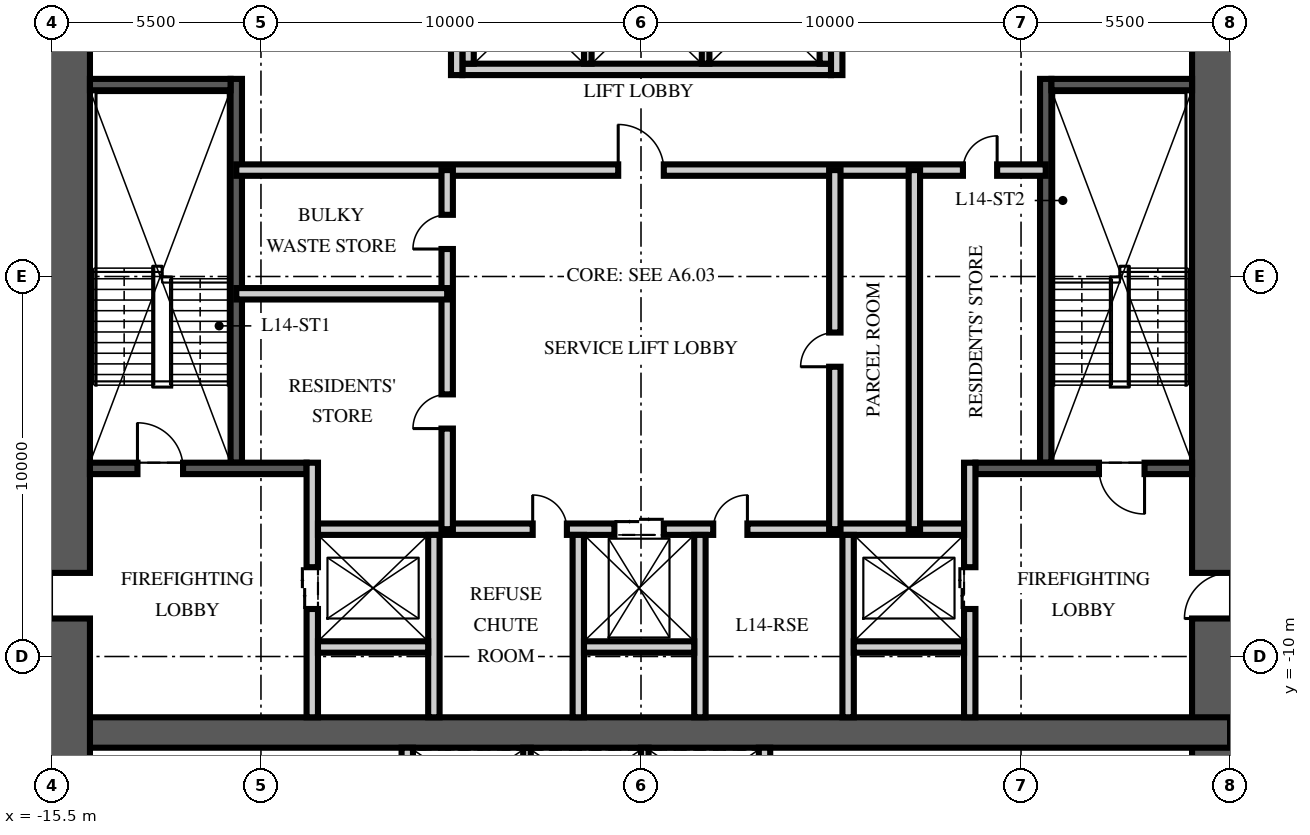
"""IFC4 building model, lengths in metres.
Left out: names, types, materials, properties, quantities, classifications, styles, units other than length and angle.
Written with IfcOpenShell. Run it as: python <this file> out.ifc"""

import sys

from ifc_helpers import new_model, si_unit, direction, frame, frame_2d, origin, place, context, subcontext, project, spatial, rectangle, extrude, element, fill, save


model = new_model("IFC4")
c1 = context("Model", 3, precision=1e-05, world=origin(), true_north=direction((0.0, 1.0)))
c2 = subcontext(c1, "Body", "Model", "MODEL_VIEW")
j1 = project(units=[si_unit("LENGTHUNIT", "METRE"), si_unit("PLANEANGLEUNIT", "RADIAN")], contexts=[c1])
p1 = place(None, origin())
s1 = spatial("IfcSite", under=j1, at=p1, CompositionType="ELEMENT")
p2 = place(p1, origin())
s2 = spatial("IfcBuilding", under=s1, at=p2, CompositionType="ELEMENT")
p3 = place(p2, frame((0.0, 0.0, 58.5)))
s3 = spatial("IfcBuildingStorey", under=s2, at=p3, CompositionType="ELEMENT", Elevation=58.5)
p4 = place(p3, frame((15.5, -15.5, -0.25), z_axis=(0.0, 0.0, 1.0), x_axis=(0.0, 1.0, 0.0)))
e1 = element("IfcWall", 1, at=p4, inside=s3, PredefinedType="SHEAR", context=c2, shape_type="SweptSolid", body=[
    extrude(rectangle(XDim=31.0, YDim=2.0, at=frame_2d((15.5, 0.0))), origin(), (0.0, 0.0, 1.0), 3.75),
])
p5 = place(p4, frame((6.5, 0.0, 0.25)))
e2 = element("IfcOpeningElement", 2, at=p5, cuts=e1, PredefinedType="OPENING", context=c2, shape_type="SweptSolid", body=[
    extrude(rectangle(XDim=1.2, YDim=2.1, at=frame_2d((0.6, 1.05))), frame((0.0, 1.01, 0.0), z_axis=(0.0, -1.0, 0.0), x_axis=(1.0, 0.0, 0.0)), (0.0, 0.0, 1.0), 2.02),
])
p6 = place(p4, frame((23.0, 0.0, 0.25)))
e3 = element("IfcOpeningElement", 3, at=p6, cuts=e1, PredefinedType="OPENING", context=c2, shape_type="SweptSolid", body=[
    extrude(rectangle(XDim=1.8, YDim=2.1, at=frame_2d((0.9, 1.05))), frame((0.0, 1.01, 0.0), z_axis=(0.0, -1.0, 0.0), x_axis=(1.0, 0.0, 0.0)), (0.0, 0.0, 1.0), 2.02),
])
p7 = place(p3, frame((-15.5, -12.0, -0.25), z_axis=(0.0, 0.0, 1.0), x_axis=(1.0, 0.0, 0.0)))
e4 = element("IfcWall", 4, at=p7, inside=s3, PredefinedType="SHEAR", context=c2, shape_type="SweptSolid", body=[
    extrude(rectangle(XDim=31.0, YDim=0.8, at=frame_2d((15.5, 0.0))), origin(), (0.0, 0.0, 1.0), 3.75),
])
p8 = place(p3, frame((-15.5, -15.5, -0.25), z_axis=(0.0, 0.0, 1.0), x_axis=(0.0, 1.0, 0.0)))
e5 = element("IfcWall", 5, at=p8, inside=s3, PredefinedType="SHEAR", context=c2, shape_type="SweptSolid", body=[
    extrude(rectangle(XDim=31.0, YDim=2.0, at=frame_2d((15.5, 0.0))), origin(), (0.0, 0.0, 1.0), 3.75),
])
p9 = place(p8, frame((6.5, 0.0, 0.25)))
e6 = element("IfcOpeningElement", 6, at=p9, cuts=e5, PredefinedType="OPENING", context=c2, shape_type="SweptSolid", body=[
    extrude(rectangle(XDim=1.2, YDim=2.1, at=frame_2d((0.6, 1.05))), frame((0.0, 1.01, 0.0), z_axis=(0.0, -1.0, 0.0), x_axis=(1.0, 0.0, 0.0)), (0.0, 0.0, 1.0), 2.02),
])
p10 = place(p8, frame((23.0, 0.0, 0.25)))
e7 = element("IfcOpeningElement", 7, at=p10, cuts=e5, PredefinedType="OPENING", context=c2, shape_type="SweptSolid", body=[
    extrude(rectangle(XDim=1.8, YDim=2.1, at=frame_2d((0.9, 1.05))), frame((0.0, 1.01, 0.0), z_axis=(0.0, -1.0, 0.0), x_axis=(1.0, 0.0, 0.0)), (0.0, 0.0, 1.0), 2.02),
])
p11 = place(p3, frame((-10.65, -4.9, 0.0), z_axis=(0.0, 0.0, 1.0), x_axis=(0.0, 1.0, 0.0)))
e8 = element("IfcWall", 8, at=p11, inside=s3, PredefinedType="SOLIDWALL", context=c2, shape_type="SweptSolid", body=[
    extrude(rectangle(XDim=10.1, YDim=0.3, at=frame_2d((5.05, 0.0))), origin(), (0.0, 0.0, 1.0), 3.5),
])
p12 = place(p3, frame((-14.5, -5.05, 0.0), z_axis=(0.0, 0.0, 1.0), x_axis=(1.0, 0.0, 0.0)))
e9 = element("IfcWall", 9, at=p12, inside=s3, PredefinedType="SOLIDWALL", context=c2, shape_type="SweptSolid", body=[
    extrude(rectangle(XDim=5.7, YDim=0.3, at=frame_2d((2.85, 0.0))), origin(), (0.0, 0.0, 1.0), 3.5),
])
p13 = place(p12, frame((1.25, 0.0, 0.0)))
e10 = element("IfcOpeningElement", 10, at=p13, cuts=e9, PredefinedType="OPENING", context=c2, shape_type="SweptSolid", body=[
    extrude(rectangle(XDim=1.2, YDim=2.1, at=frame_2d((0.6, 1.05))), frame((0.0, 0.16, 0.0), z_axis=(0.0, -1.0, 0.0), x_axis=(1.0, 0.0, 0.0)), (0.0, 0.0, 1.0), 0.32),
])
p14 = place(p3, frame((-14.5, 5.05, 0.0), z_axis=(0.0, 0.0, 1.0), x_axis=(1.0, 0.0, 0.0)))
e11 = element("IfcWall", 11, at=p14, inside=s3, PredefinedType="SOLIDWALL", context=c2, shape_type="SweptSolid", body=[
    extrude(rectangle(XDim=3.7, YDim=0.3, at=frame_2d((1.85, 0.0))), origin(), (0.0, 0.0, 1.0), 3.5),
])
p15 = place(p3, frame((-8.65, -11.6, 0.0), z_axis=(0.0, 0.0, 1.0), x_axis=(0.0, 1.0, 0.0)))
e12 = element("IfcWall", 12, at=p15, inside=s3, PredefinedType="PARTITIONING", context=c2, shape_type="SweptSolid", body=[
    extrude(rectangle(XDim=6.7, YDim=0.3, at=frame_2d((3.35, 0.0))), origin(), (0.0, 0.0, 1.0), 3.5),
])
p16 = place(p15, frame((2.85, 0.0, 0.0)))
e13 = element("IfcOpeningElement", 13, at=p16, cuts=e12, PredefinedType="OPENING", context=c2, shape_type="SweptSolid", body=[
    extrude(rectangle(XDim=1.1, YDim=2.1, at=frame_2d((0.55, 1.05))), frame((0.0, 0.16, 0.0), z_axis=(0.0, -1.0, 0.0), x_axis=(1.0, 0.0, 0.0)), (0.0, 0.0, 1.0), 0.32),
])
p17 = place(p3, frame((10.65, -4.9, 0.0), z_axis=(0.0, 0.0, 1.0), x_axis=(0.0, 1.0, 0.0)))
e14 = element("IfcWall", 14, at=p17, inside=s3, PredefinedType="SOLIDWALL", context=c2, shape_type="SweptSolid", body=[
    extrude(rectangle(XDim=10.1, YDim=0.3, at=frame_2d((5.05, 0.0))), origin(), (0.0, 0.0, 1.0), 3.5),
])
p18 = place(p3, frame((14.5, -5.05, 0.0), z_axis=(0.0, 0.0, 1.0), x_axis=(-1.0, 0.0, 0.0)))
e15 = element("IfcWall", 15, at=p18, inside=s3, PredefinedType="SOLIDWALL", context=c2, shape_type="SweptSolid", body=[
    extrude(rectangle(XDim=5.7, YDim=0.3, at=frame_2d((2.85, 0.0))), origin(), (0.0, 0.0, 1.0), 3.5),
])
p19 = place(p18, frame((1.25, 0.0, 0.0)))
e16 = element("IfcOpeningElement", 16, at=p19, cuts=e15, PredefinedType="OPENING", context=c2, shape_type="SweptSolid", body=[
    extrude(rectangle(XDim=1.2, YDim=2.1, at=frame_2d((0.6, 1.05))), frame((0.0, 0.16, 0.0), z_axis=(0.0, -1.0, 0.0), x_axis=(1.0, 0.0, 0.0)), (0.0, 0.0, 1.0), 0.32),
])
p20 = place(p3, frame((14.5, 5.05, 0.0), z_axis=(0.0, 0.0, 1.0), x_axis=(-1.0, 0.0, 0.0)))
e17 = element("IfcWall", 17, at=p20, inside=s3, PredefinedType="SOLIDWALL", context=c2, shape_type="SweptSolid", body=[
    extrude(rectangle(XDim=3.7, YDim=0.3, at=frame_2d((1.85, 0.0))), origin(), (0.0, 0.0, 1.0), 3.5),
])
p21 = place(p3, frame((8.65, -11.6, 0.0), z_axis=(0.0, 0.0, 1.0), x_axis=(0.0, 1.0, 0.0)))
e18 = element("IfcWall", 18, at=p21, inside=s3, PredefinedType="PARTITIONING", context=c2, shape_type="SweptSolid", body=[
    extrude(rectangle(XDim=6.7, YDim=0.3, at=frame_2d((3.35, 0.0))), origin(), (0.0, 0.0, 1.0), 3.5),
])
p22 = place(p21, frame((2.85, 0.0, 0.0)))
e19 = element("IfcOpeningElement", 19, at=p22, cuts=e18, PredefinedType="OPENING", context=c2, shape_type="SweptSolid", body=[
    extrude(rectangle(XDim=1.1, YDim=2.1, at=frame_2d((0.55, 1.05))), frame((0.0, 0.16, 0.0), z_axis=(0.0, -1.0, 0.0), x_axis=(1.0, 0.0, 0.0)), (0.0, 0.0, 1.0), 0.32),
])
p23 = place(p3, frame((-8.5, -6.65, 0.0), z_axis=(0.0, 0.0, 1.0), x_axis=(1.0, 0.0, 0.0)))
e20 = element("IfcWall", 20, at=p23, inside=s3, PredefinedType="PARTITIONING", context=c2, shape_type="SweptSolid", body=[
    extrude(rectangle(XDim=17.0, YDim=0.3, at=frame_2d((8.5, 0.0))), origin(), (0.0, 0.0, 1.0), 3.5),
])
p24 = place(p23, frame((7.8, 0.0, 0.0)))
e21 = element("IfcOpeningElement", 21, at=p24, cuts=e20, PredefinedType="OPENING", context=c2, shape_type="SweptSolid", body=[
    extrude(rectangle(XDim=1.3, YDim=2.4, at=frame_2d((0.65, 1.2))), frame((0.0, 0.16, 0.0), z_axis=(0.0, -1.0, 0.0), x_axis=(1.0, 0.0, 0.0)), (0.0, 0.0, 1.0), 0.32),
])
p25 = place(p23, frame((5.65, 0.0, 0.0)))
e22 = element("IfcOpeningElement", 22, at=p25, cuts=e20, PredefinedType="OPENING", context=c2, shape_type="SweptSolid", body=[
    extrude(rectangle(XDim=0.9, YDim=2.1, at=frame_2d((0.45, 1.05))), frame((0.0, 0.16, 0.0), z_axis=(0.0, -1.0, 0.0), x_axis=(1.0, 0.0, 0.0)), (0.0, 0.0, 1.0), 0.32),
])
p26 = place(p23, frame((10.4, 0.0, 0.0)))
e23 = element("IfcOpeningElement", 23, at=p26, cuts=e20, PredefinedType="OPENING", context=c2, shape_type="SweptSolid", body=[
    extrude(rectangle(XDim=0.9, YDim=2.1, at=frame_2d((0.45, 1.05))), frame((0.0, 0.16, 0.0), z_axis=(0.0, -1.0, 0.0), x_axis=(1.0, 0.0, 0.0)), (0.0, 0.0, 1.0), 0.32),
])
for number, where, z_axis, x_axis in (
    (24, (-5.45, -11.6, 0.0), (0.0, 0.0, 1.0), (0.0, 1.0, 0.0)),
    (25, (-1.65, -11.6, 0.0), (0.0, 0.0, 1.0), (0.0, 1.0, 0.0)),
    (26, (1.55, -11.6, 0.0), (0.0, 0.0, 1.0), (0.0, 1.0, 0.0)),
    (27, (5.45, -11.6, 0.0), (0.0, 0.0, 1.0), (0.0, 1.0, 0.0)),
):
    element("IfcWall", number, at=place(p3, frame(where, z_axis=z_axis, x_axis=x_axis)), inside=s3, PredefinedType="PARTITIONING", context=c2, shape_type="SweptSolid", body=[
        extrude(rectangle(XDim=4.8, YDim=0.3, at=frame_2d((2.4, 0.0))), origin(), (0.0, 0.0, 1.0), 3.5),
    ])
for number, where, z_axis, x_axis in (
    (28, (-8.5, -9.75, 0.0), (0.0, 0.0, 1.0), (1.0, 0.0, 0.0)),
    (29, (-1.5, -9.75, 0.0), (0.0, 0.0, 1.0), (1.0, 0.0, 0.0)),
    (30, (5.6, -9.75, 0.0), (0.0, 0.0, 1.0), (1.0, 0.0, 0.0)),
):
    element("IfcWall", number, at=place(p3, frame(where, z_axis=z_axis, x_axis=x_axis)), inside=s3, PredefinedType="PARTITIONING", context=c2, shape_type="SweptSolid", body=[
        extrude(rectangle(XDim=2.9, YDim=0.3, at=frame_2d((1.45, 0.0))), origin(), (0.0, 0.0, 1.0), 3.5),
    ])
p27 = place(p3, frame((-4.7, 5.45, 0.0), z_axis=(0.0, 0.0, 1.0), x_axis=(1.0, 0.0, 0.0)))
e31 = element("IfcWall", 31, at=p27, inside=s3, PredefinedType="PARTITIONING", context=c2, shape_type="SweptSolid", body=[
    extrude(rectangle(XDim=9.7, YDim=0.3, at=frame_2d((4.85, 0.0))), origin(), (0.0, 0.0, 1.0), 3.5),
])
for number, where, z_axis, x_axis in (
    (32, (-4.55, 5.6, 0.0), (0.0, 0.0, 1.0), (0.0, 1.0, 0.0)),
    (33, (4.85, 5.6, 0.0), (0.0, 0.0, 1.0), (0.0, 1.0, 0.0)),
):
    element("IfcWall", number, at=place(p3, frame(where, z_axis=z_axis, x_axis=x_axis)), inside=s3, PredefinedType="PARTITIONING", context=c2, shape_type="SweptSolid", body=[
        extrude(rectangle(XDim=2.8, YDim=0.3, at=frame_2d((1.4, 0.0))), origin(), (0.0, 0.0, 1.0), 3.5),
    ])
for number, where, z_axis, x_axis in (
    (34, (-1.4, 5.6, 0.0), (0.0, 0.0, 1.0), (0.0, 1.0, 0.0)),
    (35, (1.7, 5.6, 0.0), (0.0, 0.0, 1.0), (0.0, 1.0, 0.0)),
):
    element("IfcWall", number, at=place(p3, frame(where, z_axis=z_axis, x_axis=x_axis)), inside=s3, PredefinedType="PARTITIONING", context=c2, shape_type="SweptSolid", body=[
        extrude(rectangle(XDim=2.8, YDim=0.2, at=frame_2d((1.4, 0.0))), origin(), (0.0, 0.0, 1.0), 3.5),
    ])
for number, where, z_axis, x_axis in (
    (36, (-6.15, -14.5, 0.0), (0.0, 0.0, 1.0), (0.0, 1.0, 0.0)),
    (37, (3.25, -14.5, 0.0), (0.0, 0.0, 1.0), (0.0, 1.0, 0.0)),
):
    element("IfcWall", number, at=place(p3, frame(where, z_axis=z_axis, x_axis=x_axis)), inside=s3, PredefinedType="PARTITIONING", context=c2, shape_type="SweptSolid", body=[
        extrude(rectangle(XDim=2.1, YDim=0.3, at=frame_2d((1.05, 0.0))), origin(), (0.0, 0.0, 1.0), 3.5),
    ])
for number, where, z_axis, x_axis in (
    (38, (-3.0, -14.5, 0.0), (0.0, 0.0, 1.0), (0.0, 1.0, 0.0)),
    (39, (0.1, -14.5, 0.0), (0.0, 0.0, 1.0), (0.0, 1.0, 0.0)),
):
    element("IfcWall", number, at=place(p3, frame(where, z_axis=z_axis, x_axis=x_axis)), inside=s3, PredefinedType="PARTITIONING", context=c2, shape_type="SweptSolid", body=[
        extrude(rectangle(XDim=2.1, YDim=0.2, at=frame_2d((1.05, 0.0))), origin(), (0.0, 0.0, 1.0), 3.5),
    ])
p28 = place(p3, frame((-10.65, 2.8, 0.0), z_axis=(0.0, 0.0, 1.0), x_axis=(1.0, 0.0, 0.0)))
e40 = element("IfcWall", 40, at=p28, inside=s3, PredefinedType="PARTITIONING", context=c2, shape_type="SweptSolid", body=[
    extrude(rectangle(XDim=21.3, YDim=0.3, at=frame_2d((10.65, 0.0))), origin(), (0.0, 0.0, 1.0), 3.5),
])
p29 = place(p28, frame((10.05, 0.0, 0.0)))
e41 = element("IfcOpeningElement", 41, at=p29, cuts=e40, PredefinedType="OPENING", context=c2, shape_type="SweptSolid", body=[
    extrude(rectangle(XDim=1.2, YDim=2.1, at=frame_2d((0.6, 1.05))), frame((0.0, 0.16, 0.0), z_axis=(0.0, -1.0, 0.0), x_axis=(1.0, 0.0, 0.0)), (0.0, 0.0, 1.0), 0.32),
])
p30 = place(p28, frame((19.121, 0.0, 0.0)))
e42 = element("IfcOpeningElement", 42, at=p30, cuts=e40, PredefinedType="OPENING", context=c2, shape_type="SweptSolid", body=[
    extrude(rectangle(XDim=0.9, YDim=2.1, at=frame_2d((0.45, 1.05))), frame((0.0, 0.16, 0.0), z_axis=(0.0, -1.0, 0.0), x_axis=(1.0, 0.0, 0.0)), (0.0, 0.0, 1.0), 0.32),
])
p31 = place(p3, frame((-5.1, -6.65, 0.0), z_axis=(0.0, 0.0, 1.0), x_axis=(0.0, 1.0, 0.0)))
e43 = element("IfcWall", 43, at=p31, inside=s3, PredefinedType="PARTITIONING", context=c2, shape_type="SweptSolid", body=[
    extrude(rectangle(XDim=9.45, YDim=0.3, at=frame_2d((4.725, 0.0))), origin(), (0.0, 0.0, 1.0), 3.5),
])
p32 = place(p31, frame((2.648, 0.0, 0.0)))
e44 = element("IfcOpeningElement", 44, at=p32, cuts=e43, PredefinedType="OPENING", context=c2, shape_type="SweptSolid", body=[
    extrude(rectangle(XDim=0.9, YDim=2.1, at=frame_2d((0.45, 1.05))), frame((0.0, 0.16, 0.0), z_axis=(0.0, -1.0, 0.0), x_axis=(1.0, 0.0, 0.0)), (0.0, 0.0, 1.0), 0.32),
])
p33 = place(p31, frame((7.373, 0.0, 0.0)))
e45 = element("IfcOpeningElement", 45, at=p33, cuts=e43, PredefinedType="OPENING", context=c2, shape_type="SweptSolid", body=[
    extrude(rectangle(XDim=0.9, YDim=2.1, at=frame_2d((0.45, 1.05))), frame((0.0, 0.16, 0.0), z_axis=(0.0, -1.0, 0.0), x_axis=(1.0, 0.0, 0.0)), (0.0, 0.0, 1.0), 0.32),
])
p34 = place(p3, frame((5.1, -6.65, 0.0), z_axis=(0.0, 0.0, 1.0), x_axis=(0.0, 1.0, 0.0)))
e46 = element("IfcWall", 46, at=p34, inside=s3, PredefinedType="PARTITIONING", context=c2, shape_type="SweptSolid", body=[
    extrude(rectangle(XDim=9.45, YDim=0.3, at=frame_2d((4.725, 0.0))), origin(), (0.0, 0.0, 1.0), 3.5),
])
p35 = place(p34, frame((4.275, 0.0, 0.0)))
e47 = element("IfcOpeningElement", 47, at=p35, cuts=e46, PredefinedType="OPENING", context=c2, shape_type="SweptSolid", body=[
    extrude(rectangle(XDim=0.9, YDim=2.1, at=frame_2d((0.45, 1.05))), frame((0.0, 0.16, 0.0), z_axis=(0.0, -1.0, 0.0), x_axis=(1.0, 0.0, 0.0)), (0.0, 0.0, 1.0), 0.32),
])
p36 = place(p3, frame((-10.65, -0.455, 0.0), z_axis=(0.0, 0.0, 1.0), x_axis=(1.0, 0.0, 0.0)))
e48 = element("IfcWall", 48, at=p36, inside=s3, PredefinedType="PARTITIONING", context=c2, shape_type="SweptSolid", body=[
    extrude(rectangle(XDim=5.55, YDim=0.3, at=frame_2d((2.775, 0.0))), origin(), (0.0, 0.0, 1.0), 3.5),
])
p37 = place(p3, frame((7.193, -6.65, 0.0), z_axis=(0.0, 0.0, 1.0), x_axis=(0.0, 1.0, 0.0)))
e49 = element("IfcWall", 49, at=p37, inside=s3, PredefinedType="PARTITIONING", context=c2, shape_type="SweptSolid", body=[
    extrude(rectangle(XDim=9.45, YDim=0.3, at=frame_2d((4.725, 0.0))), origin(), (0.0, 0.0, 1.0), 3.5),
])
p38 = place(p3, frame((-4.85, 5.3, 0.0), z_axis=(0.0, 0.0, 1.0), x_axis=(0.0, 1.0, 0.0)))
e50 = element("IfcWall", 50, at=p38, inside=s3, PredefinedType="PARTITIONING", context=c2, shape_type="SweptSolid", body=[
    extrude(rectangle(XDim=6.3, YDim=0.3, at=frame_2d((3.15, 0.0))), origin(), (0.0, 0.0, 1.0), 3.5),
])
p39 = place(p38, frame((4.35, 0.0, 0.0)))
e51 = element("IfcOpeningElement", 51, at=p39, cuts=e50, PredefinedType="OPENING", context=c2, shape_type="SweptSolid", body=[
    extrude(rectangle(XDim=0.9, YDim=2.1, at=frame_2d((0.45, 1.05))), frame((0.0, 0.16, 0.0), z_axis=(0.0, -1.0, 0.0), x_axis=(1.0, 0.0, 0.0)), (0.0, 0.0, 1.0), 0.32),
])
p40 = place(p3, frame((5.15, 5.3, 0.0), z_axis=(0.0, 0.0, 1.0), x_axis=(0.0, 1.0, 0.0)))
e52 = element("IfcWall", 52, at=p40, inside=s3, PredefinedType="PARTITIONING", context=c2, shape_type="SweptSolid", body=[
    extrude(rectangle(XDim=6.3, YDim=0.3, at=frame_2d((3.15, 0.0))), origin(), (0.0, 0.0, 1.0), 3.5),
])
p41 = place(p13, origin())
e53 = element("IfcDoor", 53, at=p41, inside=s3, OperationType="SINGLE_SWING_LEFT", PredefinedType="DOOR", context=c2, shape_type="SweptSolid", body=[
    extrude(rectangle(XDim=1.2, YDim=2.1, at=frame_2d((0.6, 1.05))), frame((0.0, 0.025, 0.0), z_axis=(0.0, -1.0, 0.0), x_axis=(1.0, 0.0, 0.0)), (0.0, 0.0, 1.0), 0.05),
])
fill(e10, e53)
p42 = place(p9, origin())
e54 = element("IfcDoor", 54, at=p42, inside=s3, OperationType="SINGLE_SWING_LEFT", PredefinedType="DOOR", context=c2, shape_type="SweptSolid", body=[
    extrude(rectangle(XDim=1.2, YDim=2.1, at=frame_2d((0.6, 1.05))), frame((0.0, 0.025, 0.0), z_axis=(0.0, -1.0, 0.0), x_axis=(1.0, 0.0, 0.0)), (0.0, 0.0, 1.0), 0.05),
])
fill(e6, e54)
p43 = place(p19, origin())
e55 = element("IfcDoor", 55, at=p43, inside=s3, OperationType="SINGLE_SWING_LEFT", PredefinedType="DOOR", context=c2, shape_type="SweptSolid", body=[
    extrude(rectangle(XDim=1.2, YDim=2.1, at=frame_2d((0.6, 1.05))), frame((0.0, 0.025, 0.0), z_axis=(0.0, -1.0, 0.0), x_axis=(1.0, 0.0, 0.0)), (0.0, 0.0, 1.0), 0.05),
])
fill(e16, e55)
p44 = place(p5, origin())
e56 = element("IfcDoor", 56, at=p44, inside=s3, OperationType="SINGLE_SWING_LEFT", PredefinedType="DOOR", context=c2, shape_type="SweptSolid", body=[
    extrude(rectangle(XDim=1.2, YDim=2.1, at=frame_2d((0.6, 1.05))), frame((0.0, 0.025, 0.0), z_axis=(0.0, -1.0, 0.0), x_axis=(1.0, 0.0, 0.0)), (0.0, 0.0, 1.0), 0.05),
])
fill(e2, e56)
p45 = place(p16, origin())
e57 = element("IfcDoor", 57, at=p45, inside=s3, OperationType="DOUBLE_DOOR_SLIDING", PredefinedType="DOOR", context=c2, shape_type="SweptSolid", body=[
    extrude(rectangle(XDim=1.1, YDim=2.1, at=frame_2d((0.55, 1.05))), frame((0.0, 0.025, 0.0), z_axis=(0.0, -1.0, 0.0), x_axis=(1.0, 0.0, 0.0)), (0.0, 0.0, 1.0), 0.05),
])
fill(e13, e57)
p46 = place(p22, origin())
e58 = element("IfcDoor", 58, at=p46, inside=s3, OperationType="DOUBLE_DOOR_SLIDING", PredefinedType="DOOR", context=c2, shape_type="SweptSolid", body=[
    extrude(rectangle(XDim=1.1, YDim=2.1, at=frame_2d((0.55, 1.05))), frame((0.0, 0.025, 0.0), z_axis=(0.0, -1.0, 0.0), x_axis=(1.0, 0.0, 0.0)), (0.0, 0.0, 1.0), 0.05),
])
fill(e19, e58)
p47 = place(p24, origin())
e59 = element("IfcDoor", 59, at=p47, inside=s3, OperationType="DOUBLE_DOOR_SLIDING", PredefinedType="DOOR", context=c2, shape_type="SweptSolid", body=[
    extrude(rectangle(XDim=1.3, YDim=2.4, at=frame_2d((0.65, 1.2))), frame((0.0, 0.025, 0.0), z_axis=(0.0, -1.0, 0.0), x_axis=(1.0, 0.0, 0.0)), (0.0, 0.0, 1.0), 0.05),
])
fill(e21, e59)
p48 = place(p29, origin())
e60 = element("IfcDoor", 60, at=p48, inside=s3, OperationType="SINGLE_SWING_LEFT", PredefinedType="DOOR", context=c2, shape_type="SweptSolid", body=[
    extrude(rectangle(XDim=1.2, YDim=2.1, at=frame_2d((0.6, 1.05))), frame((0.0, 0.025, 0.0), z_axis=(0.0, -1.0, 0.0), x_axis=(1.0, 0.0, 0.0)), (0.0, 0.0, 1.0), 0.05),
])
fill(e41, e60)
p49 = place(p25, origin())
e61 = element("IfcDoor", 61, at=p49, inside=s3, OperationType="SINGLE_SWING_LEFT", PredefinedType="DOOR", context=c2, shape_type="SweptSolid", body=[
    extrude(rectangle(XDim=0.9, YDim=2.1, at=frame_2d((0.45, 1.05))), frame((0.0, 0.025, 0.0), z_axis=(0.0, -1.0, 0.0), x_axis=(1.0, 0.0, 0.0)), (0.0, 0.0, 1.0), 0.05),
])
fill(e22, e61)
p50 = place(p26, origin())
e62 = element("IfcDoor", 62, at=p50, inside=s3, OperationType="SINGLE_SWING_RIGHT", PredefinedType="DOOR", context=c2, shape_type="SweptSolid", body=[
    extrude(rectangle(XDim=0.9, YDim=2.1, at=frame_2d((0.45, 1.05))), frame((0.0, 0.025, 0.0), z_axis=(0.0, -1.0, 0.0), x_axis=(1.0, 0.0, 0.0)), (0.0, 0.0, 1.0), 0.05),
])
fill(e23, e62)
p51 = place(p32, origin())
e63 = element("IfcDoor", 63, at=p51, inside=s3, OperationType="SINGLE_SWING_LEFT", PredefinedType="DOOR", context=c2, shape_type="SweptSolid", body=[
    extrude(rectangle(XDim=0.9, YDim=2.1, at=frame_2d((0.45, 1.05))), frame((0.0, 0.025, 0.0), z_axis=(0.0, -1.0, 0.0), x_axis=(1.0, 0.0, 0.0)), (0.0, 0.0, 1.0), 0.05),
])
fill(e44, e63)
p52 = place(p33, origin())
e64 = element("IfcDoor", 64, at=p52, inside=s3, OperationType="SINGLE_SWING_LEFT", PredefinedType="DOOR", context=c2, shape_type="SweptSolid", body=[
    extrude(rectangle(XDim=0.9, YDim=2.1, at=frame_2d((0.45, 1.05))), frame((0.0, 0.025, 0.0), z_axis=(0.0, -1.0, 0.0), x_axis=(1.0, 0.0, 0.0)), (0.0, 0.0, 1.0), 0.05),
])
fill(e45, e64)
p53 = place(p35, origin())
e65 = element("IfcDoor", 65, at=p53, inside=s3, OperationType="SINGLE_SWING_LEFT", PredefinedType="DOOR", context=c2, shape_type="SweptSolid", body=[
    extrude(rectangle(XDim=0.9, YDim=2.1, at=frame_2d((0.45, 1.05))), frame((0.0, 0.025, 0.0), z_axis=(0.0, -1.0, 0.0), x_axis=(1.0, 0.0, 0.0)), (0.0, 0.0, 1.0), 0.05),
])
fill(e47, e65)
p54 = place(p30, origin())
e66 = element("IfcDoor", 66, at=p54, inside=s3, OperationType="SINGLE_SWING_RIGHT", PredefinedType="DOOR", context=c2, shape_type="SweptSolid", body=[
    extrude(rectangle(XDim=0.9, YDim=2.1, at=frame_2d((0.45, 1.05))), frame((0.0, 0.025, 0.0), z_axis=(0.0, -1.0, 0.0), x_axis=(1.0, 0.0, 0.0)), (0.0, 0.0, 1.0), 0.05),
])
fill(e42, e66)
save(model, sys.argv[1])
